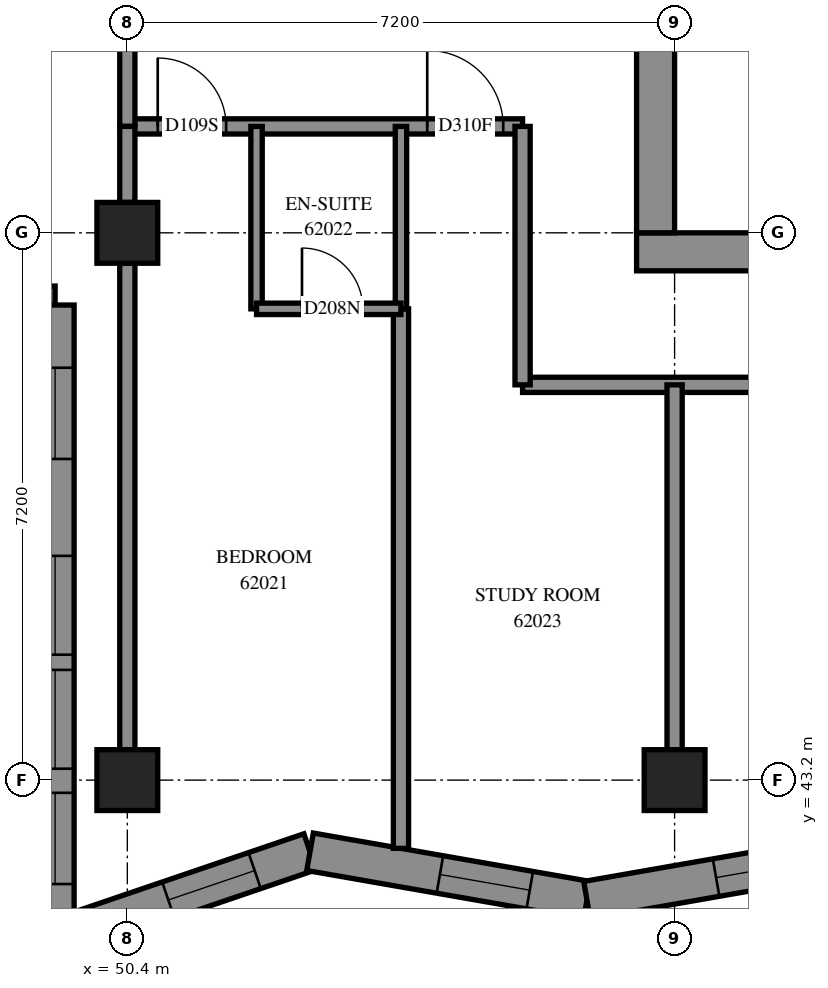
"""IFC4 building model, lengths in metres.
Left out: names, types, materials, properties, quantities, classifications, styles, units other than length and angle.
Written with IfcOpenShell. Run it as: python <this file> out.ifc"""

import sys

from ifc_helpers import new_model, si_unit, direction, frame, frame_2d, origin, origin_2d, place, context, subcontext, project, spatial, polyline, rectangle, outline, extrude, element, fill, save


model = new_model("IFC4")
c1 = context("Model", 3, precision=1e-05, world=origin(), true_north=direction((0.0, 1.0)))
c2 = subcontext(c1, "Body", "Model", "MODEL_VIEW")
j1 = project(units=[si_unit("LENGTHUNIT", "METRE"), si_unit("PLANEANGLEUNIT", "RADIAN")], contexts=[c1])
p1 = place(None, origin())
s1 = spatial("IfcSite", under=j1, at=p1, CompositionType="ELEMENT")
p2 = place(p1, origin())
s2 = spatial("IfcBuilding", under=s1, at=p2, CompositionType="ELEMENT")
p3 = place(p2, frame((0.0, 0.0, 227.0)))
s3 = spatial("IfcBuildingStorey", under=s2, at=p3, CompositionType="ELEMENT", Elevation=227.0)
for number, where, z_axis, x_axis in (
    (1, (50.4, 43.2, 0.0), (0.0, 0.0, 1.0), (1.0, 0.0, 0.0)),
    (2, (50.4, 50.4, 0.0), (0.0, 0.0, 1.0), (1.0, 0.0, 0.0)),
    (3, (57.6, 43.2, 0.0), (0.0, 0.0, 1.0), (1.0, 0.0, 0.0)),
):
    element("IfcColumn", number, at=place(p3, frame(where, z_axis=z_axis, x_axis=x_axis)), inside=s3, PredefinedType="COLUMN", context=c2, shape_type="SweptSolid", body=[
        extrude(rectangle(XDim=0.8, YDim=0.8, at=origin_2d()), origin(), (0.0, 0.0, 1.0), 3.1),
    ])
p4 = place(p3, frame((57.1, 50.15, -0.3), z_axis=(0.0, 0.0, 1.0), x_axis=(1.0, 0.0, 0.0)))
e4 = element("IfcWall", 4, at=p4, inside=s3, PredefinedType="SHEAR", context=c2, shape_type="SweptSolid", body=[
    extrude(rectangle(XDim=15.4, YDim=0.5, at=frame_2d((7.7, 0.0))), origin(), (0.0, 0.0, 1.0), 2.7),
])
p5 = place(p3, frame((57.35, 50.4, -0.3), z_axis=(0.0, 0.0, 1.0), x_axis=(0.0, 1.0, 0.0)))
e5 = element("IfcWall", 5, at=p5, inside=s3, PredefinedType="SHEAR", context=c2, shape_type="SweptSolid", body=[
    extrude(rectangle(XDim=14.4, YDim=0.5, at=frame_2d((7.2, 0.0))), origin(), (0.0, 0.0, 1.0), 2.7),
])
p6 = place(p5, frame((4.55, 0.0, 0.3)))
e6 = element("IfcOpeningElement", 6, at=p6, cuts=e5, PredefinedType="OPENING", context=c2, shape_type="SweptSolid", body=[
    extrude(rectangle(XDim=1.1, YDim=2.1, at=frame_2d((0.55, 1.05))), frame((0.0, 0.26, 0.0), z_axis=(0.0, -1.0, 0.0), x_axis=(1.0, 0.0, 0.0)), (0.0, 0.0, 1.0), 0.52),
])
p7 = place(p5, frame((11.35, 0.0, 0.3)))
e7 = element("IfcOpeningElement", 7, at=p7, cuts=e5, PredefinedType="OPENING", context=c2, shape_type="SweptSolid", body=[
    extrude(rectangle(XDim=1.1, YDim=2.1, at=frame_2d((0.55, 1.05))), frame((0.0, 0.26, 0.0), z_axis=(0.0, -1.0, 0.0), x_axis=(1.0, 0.0, 0.0)), (0.0, 0.0, 1.0), 0.52),
])
p8 = place(p3, frame((42.25, 49.45, 0.0), z_axis=(0.0, 0.0, 1.0), x_axis=(1.0, 0.0, 0.0)))
e8 = element("IfcWall", 8, at=p8, inside=s3, PredefinedType="SOLIDWALL", context=c2, shape_type="SweptSolid", body=[
    extrude(outline(polyline([(-0.25, -0.25), (6.95, -0.25), (7.45, 0.25), (0.25, 0.25), (-0.25, -0.25)])), origin(), (0.0, 0.0, 1.0), 3.1),
])
p9 = place(p8, frame((1.35, 0.0, 0.45)))
e9 = element("IfcOpeningElement", 9, at=p9, cuts=e8, PredefinedType="OPENING", context=c2, shape_type="SweptSolid", body=[
    extrude(rectangle(XDim=1.3, YDim=2.5, at=frame_2d((0.65, 1.25))), frame((0.0, 0.26, 0.0), z_axis=(0.0, -1.0, 0.0), x_axis=(1.0, 0.0, 0.0)), (0.0, 0.0, 1.0), 0.52),
])
p10 = place(p8, frame((2.85, 0.0, 0.45)))
e10 = element("IfcOpeningElement", 10, at=p10, cuts=e8, PredefinedType="OPENING", context=c2, shape_type="SweptSolid", body=[
    extrude(rectangle(XDim=1.3, YDim=2.5, at=frame_2d((0.65, 1.25))), frame((0.0, 0.26, 0.0), z_axis=(0.0, -1.0, 0.0), x_axis=(1.0, 0.0, 0.0)), (0.0, 0.0, 1.0), 0.52),
])
p11 = place(p8, frame((5.175, 0.0, 0.45)))
e11 = element("IfcOpeningElement", 11, at=p11, cuts=e8, PredefinedType="OPENING", context=c2, shape_type="SweptSolid", body=[
    extrude(rectangle(XDim=1.2, YDim=2.5, at=frame_2d((0.6, 1.25))), frame((0.0, 0.26, 0.0), z_axis=(0.0, -1.0, 0.0), x_axis=(1.0, 0.0, 0.0)), (0.0, 0.0, 1.0), 0.52),
])
p12 = place(p3, frame((49.45, 49.45, 0.0), z_axis=(0.0, 0.0, 1.0), x_axis=(0.0, -1.0, 0.0)))
e12 = element("IfcWall", 12, at=p12, inside=s3, PredefinedType="SOLIDWALL", context=c2, shape_type="SweptSolid", body=[
    extrude(outline(polyline([(0.25, -0.25), (8.683, -0.25), (7.985, 0.25), (-0.25, 0.25), (0.25, -0.25)])), origin(), (0.0, 0.0, 1.0), 3.1),
])
p13 = place(p12, frame((3.3, 0.0, 0.45)))
e13 = element("IfcOpeningElement", 13, at=p13, cuts=e12, PredefinedType="OPENING", context=c2, shape_type="SweptSolid", body=[
    extrude(rectangle(XDim=1.3, YDim=2.5, at=frame_2d((0.65, 1.25))), frame((0.0, 0.26, 0.0), z_axis=(0.0, -1.0, 0.0), x_axis=(1.0, 0.0, 0.0)), (0.0, 0.0, 1.0), 0.52),
])
p14 = place(p12, frame((4.8, 0.0, 0.45)))
e14 = element("IfcOpeningElement", 14, at=p14, cuts=e12, PredefinedType="OPENING", context=c2, shape_type="SweptSolid", body=[
    extrude(rectangle(XDim=1.3, YDim=2.5, at=frame_2d((0.65, 1.25))), frame((0.0, 0.26, 0.0), z_axis=(0.0, -1.0, 0.0), x_axis=(1.0, 0.0, 0.0)), (0.0, 0.0, 1.0), 0.52),
])
p15 = place(p12, frame((0.825, 0.0, 0.45)))
e15 = element("IfcOpeningElement", 15, at=p15, cuts=e12, PredefinedType="OPENING", context=c2, shape_type="SweptSolid", body=[
    extrude(rectangle(XDim=1.2, YDim=2.5, at=frame_2d((0.6, 1.25))), frame((0.0, 0.26, 0.0), z_axis=(0.0, -1.0, 0.0), x_axis=(1.0, 0.0, 0.0)), (0.0, 0.0, 1.0), 0.52),
])
p16 = place(p12, frame((6.417, 0.0, 0.45)))
e16 = element("IfcOpeningElement", 16, at=p16, cuts=e12, PredefinedType="OPENING", context=c2, shape_type="SweptSolid", body=[
    extrude(rectangle(XDim=1.2, YDim=2.5, at=frame_2d((0.6, 1.25))), frame((0.0, 0.26, 0.0), z_axis=(0.0, -1.0, 0.0), x_axis=(1.0, 0.0, 0.0)), (0.0, 0.0, 1.0), 0.52),
])
p17 = place(p3, frame((49.45, 41.116, 0.0), z_axis=(0.0, 0.0, 1.0), x_axis=(0.9466887442, 0.3221496883, 0.0)))
e17 = element("IfcWall", 17, at=p17, inside=s3, PredefinedType="SOLIDWALL", context=c2, shape_type="SweptSolid", body=[
    extrude(outline(polyline([(-0.349, -0.25), (3.478, -0.25), (3.606, 0.25), (0.349, 0.25), (-0.349, -0.25)])), origin(), (0.0, 0.0, 1.0), 3.1),
])
p18 = place(p17, frame((1.573, 0.0, 0.45)))
e18 = element("IfcOpeningElement", 18, at=p18, cuts=e17, PredefinedType="OPENING", context=c2, shape_type="SweptSolid", body=[
    extrude(rectangle(XDim=1.2, YDim=2.5, at=frame_2d((0.6, 1.25))), frame((0.0, 0.26, 0.0), z_axis=(0.0, -1.0, 0.0), x_axis=(1.0, 0.0, 0.0)), (0.0, 0.0, 1.0), 0.52),
])
p19 = place(p3, frame((52.804, 42.257, 0.0), z_axis=(0.0, 0.0, 1.0), x_axis=(0.9850822975, -0.1720838957, 0.0)))
e19 = element("IfcWall", 19, at=p19, inside=s3, PredefinedType="SOLIDWALL", context=c2, shape_type="SweptSolid", body=[
    extrude(outline(polyline([(0.064, -0.25), (3.742, -0.25), (3.655, 0.25), (-0.064, 0.25), (0.064, -0.25)])), origin(), (0.0, 0.0, 1.0), 3.1),
])
p20 = place(p19, frame((1.735, 0.0, 0.45)))
e20 = element("IfcOpeningElement", 20, at=p20, cuts=e19, PredefinedType="OPENING", context=c2, shape_type="SweptSolid", body=[
    extrude(rectangle(XDim=1.2, YDim=2.5, at=frame_2d((0.6, 1.25))), frame((0.0, 0.26, 0.0), z_axis=(0.0, -1.0, 0.0), x_axis=(1.0, 0.0, 0.0)), (0.0, 0.0, 1.0), 0.52),
])
p21 = place(p3, frame((56.447, 41.621, 0.0), z_axis=(0.0, 0.0, 1.0), x_axis=(0.9850825833, 0.1720822594, 0.0)))
e21 = element("IfcWall", 21, at=p21, inside=s3, PredefinedType="SOLIDWALL", context=c2, shape_type="SweptSolid", body=[
    extrude(outline(polyline([(-0.044, -0.25), (3.635, -0.25), (3.722, 0.25), (0.044, 0.25), (-0.044, -0.25)])), origin(), (0.0, 0.0, 1.0), 3.1),
])
p22 = place(p21, frame((1.724, 0.0, 0.45)))
e22 = element("IfcOpeningElement", 22, at=p22, cuts=e21, PredefinedType="OPENING", context=c2, shape_type="SweptSolid", body=[
    extrude(rectangle(XDim=1.2, YDim=2.5, at=frame_2d((0.6, 1.25))), frame((0.0, 0.26, 0.0), z_axis=(0.0, -1.0, 0.0), x_axis=(1.0, 0.0, 0.0)), (0.0, 0.0, 1.0), 0.52),
])
p23 = place(p3, frame((55.6, 48.4, 0.0), z_axis=(0.0, 0.0, 1.0), x_axis=(1.0, 0.0, 0.0)))
e23 = element("IfcWall", 23, at=p23, inside=s3, PredefinedType="PARTITIONING", context=c2, shape_type="SweptSolid", body=[
    extrude(rectangle(XDim=18.4, YDim=0.2, at=frame_2d((9.2, 0.0))), origin(), (0.0, 0.0, 1.0), 3.1),
])
p24 = place(p23, frame((5.862, 0.0, 0.0)))
e24 = element("IfcOpeningElement", 24, at=p24, cuts=e23, PredefinedType="OPENING", context=c2, shape_type="SweptSolid", body=[
    extrude(rectangle(XDim=1.0, YDim=2.1, at=frame_2d((0.5, 1.05))), frame((0.0, 0.11, 0.0), z_axis=(0.0, -1.0, 0.0), x_axis=(1.0, 0.0, 0.0)), (0.0, 0.0, 1.0), 0.22),
])
p25 = place(p23, frame((13.061, 0.0, 0.0)))
e25 = element("IfcOpeningElement", 25, at=p25, cuts=e23, PredefinedType="OPENING", context=c2, shape_type="SweptSolid", body=[
    extrude(rectangle(XDim=0.9, YDim=2.1, at=frame_2d((0.45, 1.05))), frame((0.0, 0.11, 0.0), z_axis=(0.0, -1.0, 0.0), x_axis=(1.0, 0.0, 0.0)), (0.0, 0.0, 1.0), 0.22),
])
p26 = place(p3, frame((54.0, 42.302, 0.0), z_axis=(0.0, 0.0, 1.0), x_axis=(0.0, 1.0, 0.0)))
e26 = element("IfcWall", 26, at=p26, inside=s3, PredefinedType="PARTITIONING", context=c2, shape_type="SweptSolid", body=[
    extrude(rectangle(XDim=7.098, YDim=0.2, at=frame_2d((3.549, 0.0))), origin(), (0.0, 0.0, 1.0), 3.1),
])
p27 = place(p3, frame((50.4, 43.6, 0.0), z_axis=(0.0, 0.0, 1.0), x_axis=(0.0, 1.0, 0.0)))
e27 = element("IfcWall", 27, at=p27, inside=s3, PredefinedType="PARTITIONING", context=c2, shape_type="SweptSolid", body=[
    extrude(rectangle(XDim=6.4, YDim=0.2, at=frame_2d((3.2, 0.0))), origin(), (0.0, 0.0, 1.0), 2.6),
])
p28 = place(p3, frame((50.4, 51.8, 0.0), z_axis=(0.0, 0.0, 1.0), x_axis=(1.0, 0.0, 0.0)))
e28 = element("IfcWall", 28, at=p28, inside=s3, PredefinedType="PARTITIONING", context=c2, shape_type="SweptSolid", body=[
    extrude(rectangle(XDim=5.2, YDim=0.2, at=frame_2d((2.6, 0.0))), origin(), (0.0, 0.0, 1.0), 3.1),
])
p29 = place(p28, frame((0.4, 0.0, 0.0)))
e29 = element("IfcOpeningElement", 29, at=p29, cuts=e28, PredefinedType="OPENING", context=c2, shape_type="SweptSolid", body=[
    extrude(rectangle(XDim=0.9, YDim=2.1, at=frame_2d((0.45, 1.05))), frame((0.0, 0.11, 0.0), z_axis=(0.0, -1.0, 0.0), x_axis=(1.0, 0.0, 0.0)), (0.0, 0.0, 1.0), 0.22),
])
p30 = place(p28, frame((3.946, 0.0, 0.0)))
e30 = element("IfcOpeningElement", 30, at=p30, cuts=e28, PredefinedType="OPENING", context=c2, shape_type="SweptSolid", body=[
    extrude(rectangle(XDim=1.0, YDim=2.1, at=frame_2d((0.5, 1.05))), frame((0.0, 0.11, 0.0), z_axis=(0.0, -1.0, 0.0), x_axis=(1.0, 0.0, 0.0)), (0.0, 0.0, 1.0), 0.22),
])
p31 = place(p3, frame((57.6, 43.6, 0.0), z_axis=(0.0, 0.0, 1.0), x_axis=(0.0, 1.0, 0.0)))
e31 = element("IfcWall", 31, at=p31, inside=s3, PredefinedType="PARTITIONING", context=c2, shape_type="SweptSolid", body=[
    extrude(rectangle(XDim=4.8, YDim=0.2, at=frame_2d((2.4, 0.0))), origin(), (0.0, 0.0, 1.0), 3.1),
])
p32 = place(p3, frame((55.6, 48.4, 0.0), z_axis=(0.0, 0.0, 1.0), x_axis=(0.0, 1.0, 0.0)))
e32 = element("IfcWall", 32, at=p32, inside=s3, PredefinedType="PARTITIONING", context=c2, shape_type="SweptSolid", body=[
    extrude(rectangle(XDim=3.4, YDim=0.2, at=frame_2d((1.7, 0.0))), origin(), (0.0, 0.0, 1.0), 3.1),
])
for number, where, z_axis, x_axis in (
    (33, (52.1, 49.4, 0.0), (0.0, 0.0, 1.0), (0.0, 1.0, 0.0)),
    (34, (54.0, 49.4, 0.0), (0.0, 0.0, 1.0), (0.0, 1.0, 0.0)),
):
    element("IfcWall", number, at=place(p3, frame(where, z_axis=z_axis, x_axis=x_axis)), inside=s3, PredefinedType="PARTITIONING", context=c2, shape_type="SweptSolid", body=[
        extrude(rectangle(XDim=2.4, YDim=0.15, at=frame_2d((1.2, 0.0))), origin(), (0.0, 0.0, 1.0), 3.1),
    ])
p33 = place(p3, frame((50.4, 51.8, 0.0), z_axis=(0.0, 0.0, 1.0), x_axis=(0.0, 1.0, 0.0)))
e35 = element("IfcWall", 35, at=p33, inside=s3, PredefinedType="PARTITIONING", context=c2, shape_type="SweptSolid", body=[
    extrude(rectangle(XDim=2.0, YDim=0.2, at=frame_2d((1.0, 0.0))), origin(), (0.0, 0.0, 1.0), 3.1),
])
p34 = place(p3, frame((52.1, 49.4, 0.0), z_axis=(0.0, 0.0, 1.0), x_axis=(1.0, 0.0, 0.0)))
e36 = element("IfcWall", 36, at=p34, inside=s3, PredefinedType="PARTITIONING", context=c2, shape_type="SweptSolid", body=[
    extrude(rectangle(XDim=1.9, YDim=0.15, at=frame_2d((0.95, 0.0))), origin(), (0.0, 0.0, 1.0), 3.1),
])
p35 = place(p34, frame((0.598, 0.0, 0.0)))
e37 = element("IfcOpeningElement", 37, at=p35, cuts=e36, PredefinedType="OPENING", context=c2, shape_type="SweptSolid", body=[
    extrude(rectangle(XDim=0.8, YDim=2.1, at=frame_2d((0.4, 1.05))), frame((0.0, 0.085, 0.0), z_axis=(0.0, -1.0, 0.0), x_axis=(1.0, 0.0, 0.0)), (0.0, 0.0, 1.0), 0.17),
])
p36 = place(p3, frame((50.4, 50.8, 0.0), z_axis=(0.0, 0.0, 1.0), x_axis=(0.0, 1.0, 0.0)))
e38 = element("IfcWall", 38, at=p36, inside=s3, PredefinedType="PARTITIONING", context=c2, shape_type="SweptSolid", body=[
    extrude(rectangle(XDim=1.0, YDim=0.2, at=frame_2d((0.5, 0.0))), origin(), (0.0, 0.0, 1.0), 3.1),
])
p37 = place(p13, origin())
e39 = element("IfcWindow", 39, at=p37, inside=s3, PartitioningType="SINGLE_PANEL", PredefinedType="WINDOW", context=c2, shape_type="SweptSolid", body=[
    extrude(rectangle(XDim=1.3, YDim=2.5, at=frame_2d((0.65, 1.25))), frame((0.0, 0.18, 0.0), z_axis=(0.0, -1.0, 0.0), x_axis=(1.0, 0.0, 0.0)), (0.0, 0.0, 1.0), 0.06),
])
fill(e13, e39)
p38 = place(p14, origin())
e40 = element("IfcWindow", 40, at=p38, inside=s3, PartitioningType="SINGLE_PANEL", PredefinedType="WINDOW", context=c2, shape_type="SweptSolid", body=[
    extrude(rectangle(XDim=1.3, YDim=2.5, at=frame_2d((0.65, 1.25))), frame((0.0, 0.18, 0.0), z_axis=(0.0, -1.0, 0.0), x_axis=(1.0, 0.0, 0.0)), (0.0, 0.0, 1.0), 0.06),
])
fill(e14, e40)
p39 = place(p15, origin())
e41 = element("IfcWindow", 41, at=p39, inside=s3, PartitioningType="SINGLE_PANEL", PredefinedType="WINDOW", context=c2, shape_type="SweptSolid", body=[
    extrude(rectangle(XDim=1.2, YDim=2.5, at=frame_2d((0.6, 1.25))), frame((0.0, 0.18, 0.0), z_axis=(0.0, -1.0, 0.0), x_axis=(1.0, 0.0, 0.0)), (0.0, 0.0, 1.0), 0.06),
])
fill(e15, e41)
p40 = place(p16, origin())
e42 = element("IfcWindow", 42, at=p40, inside=s3, PartitioningType="SINGLE_PANEL", PredefinedType="WINDOW", context=c2, shape_type="SweptSolid", body=[
    extrude(rectangle(XDim=1.2, YDim=2.5, at=frame_2d((0.6, 1.25))), frame((0.0, 0.18, 0.0), z_axis=(0.0, -1.0, 0.0), x_axis=(1.0, 0.0, 0.0)), (0.0, 0.0, 1.0), 0.06),
])
fill(e16, e42)
p41 = place(p18, origin())
e43 = element("IfcWindow", 43, at=p41, inside=s3, PartitioningType="SINGLE_PANEL", PredefinedType="WINDOW", context=c2, shape_type="SweptSolid", body=[
    extrude(rectangle(XDim=1.2, YDim=2.5, at=frame_2d((0.6, 1.25))), frame((0.0, 0.18, 0.0), z_axis=(0.0, -1.0, 0.0), x_axis=(1.0, 0.0, 0.0)), (0.0, 0.0, 1.0), 0.06),
])
fill(e18, e43)
p42 = place(p20, origin())
e44 = element("IfcWindow", 44, at=p42, inside=s3, PartitioningType="SINGLE_PANEL", PredefinedType="WINDOW", context=c2, shape_type="SweptSolid", body=[
    extrude(rectangle(XDim=1.2, YDim=2.5, at=frame_2d((0.6, 1.25))), frame((0.0, 0.18, 0.0), z_axis=(0.0, -1.0, 0.0), x_axis=(1.0, 0.0, 0.0)), (0.0, 0.0, 1.0), 0.06),
])
fill(e20, e44)
p43 = place(p22, origin())
e45 = element("IfcWindow", 45, at=p43, inside=s3, PartitioningType="SINGLE_PANEL", PredefinedType="WINDOW", context=c2, shape_type="SweptSolid", body=[
    extrude(rectangle(XDim=1.2, YDim=2.5, at=frame_2d((0.6, 1.25))), frame((0.0, 0.18, 0.0), z_axis=(0.0, -1.0, 0.0), x_axis=(1.0, 0.0, 0.0)), (0.0, 0.0, 1.0), 0.06),
])
fill(e22, e45)
p44 = place(p29, origin())
e46 = element("IfcDoor", 46, at=p44, inside=s3, OperationType="SINGLE_SWING_LEFT", PredefinedType="DOOR", context=c2, shape_type="SweptSolid", body=[
    extrude(rectangle(XDim=0.9, YDim=2.1, at=frame_2d((0.45, 1.05))), frame((0.0, 0.025, 0.0), z_axis=(0.0, -1.0, 0.0), x_axis=(1.0, 0.0, 0.0)), (0.0, 0.0, 1.0), 0.05),
])
fill(e29, e46)
p45 = place(p35, origin())
e47 = element("IfcDoor", 47, at=p45, inside=s3, OperationType="SINGLE_SWING_RIGHT", PredefinedType="DOOR", context=c2, shape_type="SweptSolid", body=[
    extrude(rectangle(XDim=0.8, YDim=2.1, at=frame_2d((0.4, 1.05))), frame((0.0, 0.025, 0.0), z_axis=(0.0, -1.0, 0.0), x_axis=(1.0, 0.0, 0.0)), (0.0, 0.0, 1.0), 0.05),
])
fill(e37, e47)
p46 = place(p30, origin())
e48 = element("IfcDoor", 48, at=p46, inside=s3, OperationType="SINGLE_SWING_RIGHT", PredefinedType="DOOR", context=c2, shape_type="SweptSolid", body=[
    extrude(rectangle(XDim=1.0, YDim=2.1, at=frame_2d((0.5, 1.05))), frame((0.0, 0.025, 0.0), z_axis=(0.0, -1.0, 0.0), x_axis=(1.0, 0.0, 0.0)), (0.0, 0.0, 1.0), 0.05),
])
fill(e30, e48)
save(model, sys.argv[1])
